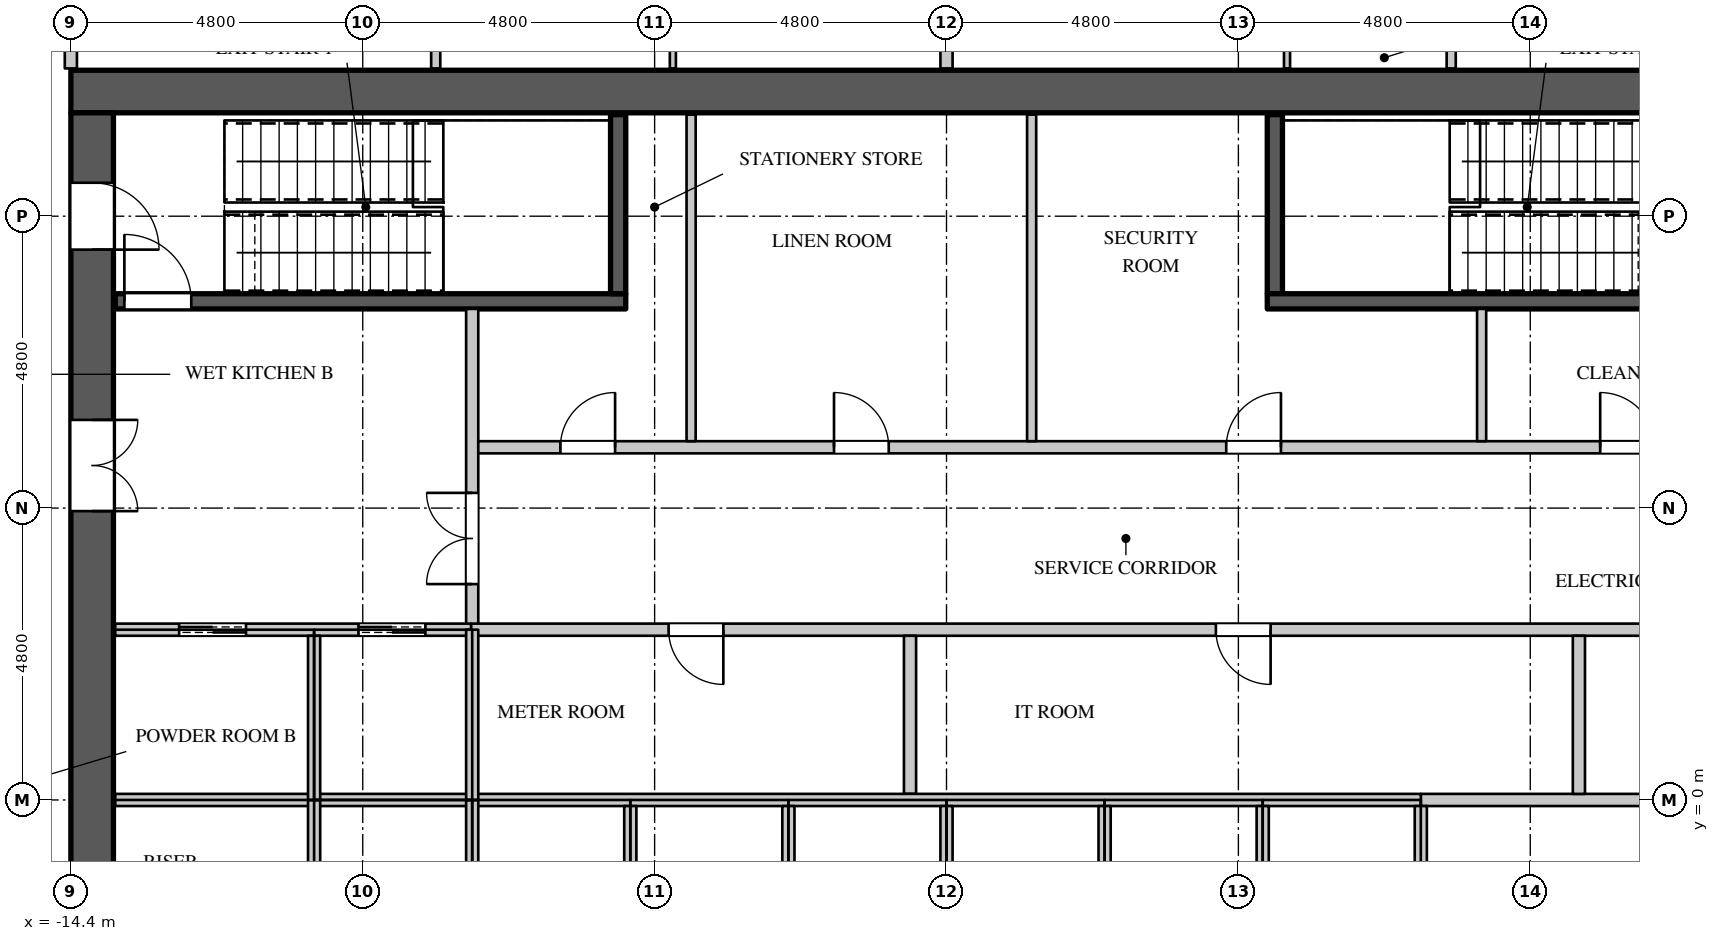
"""IFC4 building model, lengths in metres.
Left out: names, types, materials, properties, quantities, classifications, styles, units other than length and angle.
Written with IfcOpenShell. Run it as: python <this file> out.ifc"""

import sys

from ifc_helpers import new_model, si_unit, direction, frame, frame_2d, origin, place, context, subcontext, project, spatial, rectangle, extrude, element, fill, save


model = new_model("IFC4")
c1 = context("Model", 3, precision=1e-05, world=origin(), true_north=direction((0.0, 1.0)))
c2 = subcontext(c1, "Body", "Model", "MODEL_VIEW")
j1 = project(units=[si_unit("LENGTHUNIT", "METRE"), si_unit("PLANEANGLEUNIT", "RADIAN")], contexts=[c1])
p1 = place(None, origin())
s1 = spatial("IfcSite", under=j1, at=p1, CompositionType="ELEMENT")
p2 = place(p1, origin())
s2 = spatial("IfcBuilding", under=s1, at=p2, CompositionType="ELEMENT")
p3 = place(p2, frame((0.0, 0.0, 204.3)))
s3 = spatial("IfcBuildingStorey", under=s2, at=p3, CompositionType="ELEMENT", Elevation=204.3)
p4 = place(p3, frame((-14.4, 11.65, 0.0), z_axis=(0.0, 0.0, 1.0), x_axis=(1.0, 0.0, 0.0)))
e1 = element("IfcWall", 1, at=p4, inside=s3, PredefinedType="SHEAR", context=c2, shape_type="SweptSolid", body=[
    extrude(rectangle(XDim=28.8, YDim=0.7, at=frame_2d((14.4, 0.0))), origin(), (0.0, 0.0, 1.0), 4.2),
])
p5 = place(p3, frame((-14.05, -11.3, 0.0), z_axis=(0.0, 0.0, 1.0), x_axis=(0.0, 1.0, 0.0)))
e2 = element("IfcWall", 2, at=p5, inside=s3, PredefinedType="SHEAR", context=c2, shape_type="SweptSolid", body=[
    extrude(rectangle(XDim=22.6, YDim=0.7, at=frame_2d((11.3, 0.0))), origin(), (0.0, 0.0, 1.0), 4.2),
])
p6 = place(p5, frame((20.35, 0.0, 0.0)))
e3 = element("IfcOpeningElement", 3, at=p6, cuts=e2, PredefinedType="OPENING", context=c2, shape_type="SweptSolid", body=[
    extrude(rectangle(XDim=1.1, YDim=2.2, at=frame_2d((0.55, 1.1))), frame((0.0, 0.36, 0.0), z_axis=(0.0, -1.0, 0.0), x_axis=(1.0, 0.0, 0.0)), (0.0, 0.0, 1.0), 0.72),
])
p7 = place(p5, frame((1.15, 0.0, 0.0)))
e4 = element("IfcOpeningElement", 4, at=p7, cuts=e2, PredefinedType="OPENING", context=c2, shape_type="SweptSolid", body=[
    extrude(rectangle(XDim=1.1, YDim=2.2, at=frame_2d((0.55, 1.1))), frame((0.0, 0.36, 0.0), z_axis=(0.0, -1.0, 0.0), x_axis=(1.0, 0.0, 0.0)), (0.0, 0.0, 1.0), 0.72),
])
p8 = place(p5, frame((16.05, 0.0, 0.0)))
e5 = element("IfcOpeningElement", 5, at=p8, cuts=e2, PredefinedType="OPENING", context=c2, shape_type="SweptSolid", body=[
    extrude(rectangle(XDim=1.5, YDim=2.4, at=frame_2d((0.75, 1.2))), frame((0.0, 0.36, 0.0), z_axis=(0.0, -1.0, 0.0), x_axis=(1.0, 0.0, 0.0)), (0.0, 0.0, 1.0), 0.72),
])
p9 = place(p5, frame((5.05, 0.0, 0.0)))
e6 = element("IfcOpeningElement", 6, at=p9, cuts=e2, PredefinedType="OPENING", context=c2, shape_type="SweptSolid", body=[
    extrude(rectangle(XDim=1.5, YDim=2.4, at=frame_2d((0.75, 1.2))), frame((0.0, 0.36, 0.0), z_axis=(0.0, -1.0, 0.0), x_axis=(1.0, 0.0, 0.0)), (0.0, 0.0, 1.0), 0.72),
])
p10 = place(p3, frame((-14.4, 12.03, 0.0), z_axis=(0.0, 0.0, 1.0), x_axis=(0.0, 1.0, 0.0)))
e7 = element("IfcWall", 7, at=p10, inside=s3, PredefinedType="PARTITIONING", context=c2, shape_type="SweptSolid", body=[
    extrude(rectangle(XDim=2.27, YDim=0.2, at=frame_2d((1.135, 0.0))), origin(), (0.0, 0.0, 1.0), 3.798),
])
p11 = place(p3, frame((-7.8, 2.8, 0.0), z_axis=(0.0, 0.0, 1.0), x_axis=(0.0, 1.0, 0.0)))
e8 = element("IfcWall", 8, at=p11, inside=s3, PredefinedType="PARTITIONING", context=c2, shape_type="SweptSolid", body=[
    extrude(rectangle(XDim=5.275, YDim=0.2, at=frame_2d((2.637, 0.0))), origin(), (0.0, 0.0, 1.0), 3.798),
])
p12 = place(p11, frame((0.75, 0.0, 0.0)))
e9 = element("IfcOpeningElement", 9, at=p12, cuts=e8, PredefinedType="OPENING", context=c2, shape_type="SweptSolid", body=[
    extrude(rectangle(XDim=1.5, YDim=2.4, at=frame_2d((0.75, 1.2))), frame((0.0, 0.11, 0.0), z_axis=(0.0, -1.0, 0.0), x_axis=(1.0, 0.0, 0.0)), (0.0, 0.0, 1.0), 0.22),
])
p13 = place(p3, frame((-7.7, 5.8, 0.0), z_axis=(0.0, 0.0, 1.0), x_axis=(1.0, 0.0, 0.0)))
e10 = element("IfcWall", 10, at=p13, inside=s3, PredefinedType="PARTITIONING", context=c2, shape_type="SweptSolid", body=[
    extrude(rectangle(XDim=21.37, YDim=0.2, at=frame_2d((10.685, 0.0))), origin(), (0.0, 0.0, 1.0), 3.798),
])
p14 = place(p13, frame((1.35, 0.0, 0.0)))
e11 = element("IfcOpeningElement", 11, at=p14, cuts=e10, PredefinedType="OPENING", context=c2, shape_type="SweptSolid", body=[
    extrude(rectangle(XDim=0.9, YDim=2.2, at=frame_2d((0.45, 1.1))), frame((0.0, 0.11, 0.0), z_axis=(0.0, -1.0, 0.0), x_axis=(1.0, 0.0, 0.0)), (0.0, 0.0, 1.0), 0.22),
])
p15 = place(p13, frame((5.85, 0.0, 0.0)))
e12 = element("IfcOpeningElement", 12, at=p15, cuts=e10, PredefinedType="OPENING", context=c2, shape_type="SweptSolid", body=[
    extrude(rectangle(XDim=0.9, YDim=2.2, at=frame_2d((0.45, 1.1))), frame((0.0, 0.11, 0.0), z_axis=(0.0, -1.0, 0.0), x_axis=(1.0, 0.0, 0.0)), (0.0, 0.0, 1.0), 0.22),
])
p16 = place(p13, frame((12.3, 0.0, 0.0)))
e13 = element("IfcOpeningElement", 13, at=p16, cuts=e10, PredefinedType="OPENING", context=c2, shape_type="SweptSolid", body=[
    extrude(rectangle(XDim=0.9, YDim=2.2, at=frame_2d((0.45, 1.1))), frame((0.0, 0.11, 0.0), z_axis=(0.0, -1.0, 0.0), x_axis=(1.0, 0.0, 0.0)), (0.0, 0.0, 1.0), 0.22),
])
p17 = place(p13, frame((18.45, 0.0, 0.0)))
e14 = element("IfcOpeningElement", 14, at=p17, cuts=e10, PredefinedType="OPENING", context=c2, shape_type="SweptSolid", body=[
    extrude(rectangle(XDim=0.9, YDim=2.2, at=frame_2d((0.45, 1.1))), frame((0.0, 0.11, 0.0), z_axis=(0.0, -1.0, 0.0), x_axis=(1.0, 0.0, 0.0)), (0.0, 0.0, 1.0), 0.22),
])
p18 = place(p3, frame((-8.4, 12.03, 0.0), z_axis=(0.0, 0.0, 1.0), x_axis=(0.0, 1.0, 0.0)))
e15 = element("IfcWall", 15, at=p18, inside=s3, PredefinedType="PARTITIONING", context=c2, shape_type="SweptSolid", body=[
    extrude(rectangle(XDim=4.245, YDim=0.15, at=frame_2d((2.123, 0.0))), origin(), (0.0, 0.0, 1.0), 3.798),
])
for number, where, z_axis, x_axis in (
    (16, (-4.2, 5.9, 0.0), (0.0, 0.0, 1.0), (0.0, 1.0, 0.0)),
    (17, (1.4, 5.9, 0.0), (0.0, 0.0, 1.0), (0.0, 1.0, 0.0)),
):
    element("IfcWall", number, at=place(p3, frame(where, z_axis=z_axis, x_axis=x_axis)), inside=s3, PredefinedType="PARTITIONING", context=c2, shape_type="SweptSolid", body=[
        extrude(rectangle(XDim=5.37, YDim=0.15, at=frame_2d((2.685, 0.0))), origin(), (0.0, 0.0, 1.0), 3.798),
    ])
p19 = place(p3, frame((8.3, 12.03, 0.0), z_axis=(0.0, 0.0, 1.0), x_axis=(0.0, 1.0, 0.0)))
e18 = element("IfcWall", 18, at=p19, inside=s3, PredefinedType="PARTITIONING", context=c2, shape_type="SweptSolid", body=[
    extrude(rectangle(XDim=3.445, YDim=0.15, at=frame_2d((1.723, 0.0))), origin(), (0.0, 0.0, 1.0), 3.798),
])
p20 = place(p19, frame((1.2, 0.0, 0.0)))
e19 = element("IfcOpeningElement", 19, at=p20, cuts=e18, PredefinedType="OPENING", context=c2, shape_type="SweptSolid", body=[
    extrude(rectangle(XDim=0.95, YDim=2.2, at=frame_2d((0.475, 1.1))), frame((0.0, 0.085, 0.0), z_axis=(0.0, -1.0, 0.0), x_axis=(1.0, 0.0, 0.0)), (0.0, 0.0, 1.0), 0.17),
])
p21 = place(p3, frame((8.8, 5.9, 0.0), z_axis=(0.0, 0.0, 1.0), x_axis=(0.0, 1.0, 0.0)))
e20 = element("IfcWall", 20, at=p21, inside=s3, PredefinedType="PARTITIONING", context=c2, shape_type="SweptSolid", body=[
    extrude(rectangle(XDim=2.175, YDim=0.15, at=frame_2d((1.087, 0.0))), origin(), (0.0, 0.0, 1.0), 3.798),
])
p22 = place(p3, frame((0.0, 12.03, 0.0), z_axis=(0.0, 0.0, 1.0), x_axis=(0.0, 1.0, 0.0)))
e21 = element("IfcWall", 21, at=p22, inside=s3, PredefinedType="PARTITIONING", context=c2, shape_type="SweptSolid", body=[
    extrude(rectangle(XDim=11.995, YDim=0.2, at=frame_2d((5.998, 0.0))), origin(), (0.0, 0.0, 1.0), 3.798),
])
p23 = place(p3, frame((-7.82, 2.8, 0.0), z_axis=(0.0, 0.0, 1.0), x_axis=(1.0, 0.0, 0.0)))
e22 = element("IfcWall", 22, at=p23, inside=s3, PredefinedType="PARTITIONING", context=c2, shape_type="SweptSolid", body=[
    extrude(rectangle(XDim=21.49, YDim=0.2, at=frame_2d((10.745, 0.0))), origin(), (0.0, 0.0, 1.0), 3.798),
])
p24 = place(p23, frame((19.5, 0.0, 0.0)))
e23 = element("IfcOpeningElement", 23, at=p24, cuts=e22, PredefinedType="OPENING", context=c2, shape_type="SweptSolid", body=[
    extrude(rectangle(XDim=0.6, YDim=2.0, at=frame_2d((0.3, 1.0))), frame((0.0, 0.11, 0.0), z_axis=(0.0, -1.0, 0.0), x_axis=(1.0, 0.0, 0.0)), (0.0, 0.0, 1.0), 0.22),
])
p25 = place(p23, frame((3.25, 0.0, 0.0)))
e24 = element("IfcOpeningElement", 24, at=p25, cuts=e22, PredefinedType="OPENING", context=c2, shape_type="SweptSolid", body=[
    extrude(rectangle(XDim=0.9, YDim=2.2, at=frame_2d((0.45, 1.1))), frame((0.0, 0.11, 0.0), z_axis=(0.0, -1.0, 0.0), x_axis=(1.0, 0.0, 0.0)), (0.0, 0.0, 1.0), 0.22),
])
p26 = place(p23, frame((12.25, 0.0, 0.0)))
e25 = element("IfcOpeningElement", 25, at=p26, cuts=e22, PredefinedType="OPENING", context=c2, shape_type="SweptSolid", body=[
    extrude(rectangle(XDim=0.9, YDim=2.2, at=frame_2d((0.45, 1.1))), frame((0.0, 0.11, 0.0), z_axis=(0.0, -1.0, 0.0), x_axis=(1.0, 0.0, 0.0)), (0.0, 0.0, 1.0), 0.22),
])
p27 = place(p3, frame((-0.6, 0.1, 0.0), z_axis=(0.0, 0.0, 1.0), x_axis=(0.0, 1.0, 0.0)))
e26 = element("IfcWall", 26, at=p27, inside=s3, PredefinedType="PARTITIONING", context=c2, shape_type="SweptSolid", body=[
    extrude(rectangle(XDim=2.6, YDim=0.2, at=frame_2d((1.3, 0.0))), origin(), (0.0, 0.0, 1.0), 3.798),
])
p28 = place(p3, frame((7.8, 0.0, 0.0), z_axis=(0.0, 0.0, 1.0), x_axis=(1.0, 0.0, 0.0)))
e27 = element("IfcWall", 27, at=p28, inside=s3, PredefinedType="PARTITIONING", context=c2, shape_type="SweptSolid", body=[
    extrude(rectangle(XDim=5.87, YDim=0.2, at=frame_2d((2.935, 0.0))), origin(), (0.0, 0.0, 1.0), 3.798),
])
p29 = place(p3, frame((10.4, 0.1, 0.0), z_axis=(0.0, 0.0, 1.0), x_axis=(0.0, 1.0, 0.0)))
e28 = element("IfcWall", 28, at=p29, inside=s3, PredefinedType="PARTITIONING", context=c2, shape_type="SweptSolid", body=[
    extrude(rectangle(XDim=2.6, YDim=0.2, at=frame_2d((1.3, 0.0))), origin(), (0.0, 0.0, 1.0), 3.798),
])
p30 = place(p3, frame((-13.67, 0.0, 0.0), z_axis=(0.0, 0.0, 1.0), x_axis=(1.0, 0.0, 0.0)))
e29 = element("IfcWall", 29, at=p30, inside=s3, PredefinedType="PARTITIONING", context=c2, shape_type="SweptSolid", body=[
    extrude(rectangle(XDim=21.47, YDim=0.2, at=frame_2d((10.735, 0.0))), origin(), (0.0, 0.0, 1.0), 3.798),
])
p31 = place(p3, frame((-13.67, 2.8, 0.0), z_axis=(0.0, 0.0, 1.0), x_axis=(1.0, 0.0, 0.0)))
e30 = element("IfcWall", 30, at=p31, inside=s3, PredefinedType="PARTITIONING", context=c2, shape_type="SweptSolid", body=[
    extrude(rectangle(XDim=5.85, YDim=0.2, at=frame_2d((2.925, 0.0))), origin(), (0.0, 0.0, 1.0), 3.798),
])
p32 = place(p31, frame((1.05, 0.0, 0.0)))
e31 = element("IfcOpeningElement", 31, at=p32, cuts=e30, PredefinedType="OPENING", context=c2, shape_type="SweptSolid", body=[
    extrude(rectangle(XDim=1.1, YDim=2.2, at=frame_2d((0.55, 1.1))), frame((0.0, 0.11, 0.0), z_axis=(0.0, -1.0, 0.0), x_axis=(1.0, 0.0, 0.0)), (0.0, 0.0, 1.0), 0.22),
])
p33 = place(p31, frame((4.0, 0.0, 0.0)))
e32 = element("IfcOpeningElement", 32, at=p33, cuts=e30, PredefinedType="OPENING", context=c2, shape_type="SweptSolid", body=[
    extrude(rectangle(XDim=1.1, YDim=2.2, at=frame_2d((0.55, 1.1))), frame((0.0, 0.11, 0.0), z_axis=(0.0, -1.0, 0.0), x_axis=(1.0, 0.0, 0.0)), (0.0, 0.0, 1.0), 0.22),
])
for number, where, z_axis, x_axis in (
    (33, (-10.4, -2.7, 0.0), (0.0, 0.0, 1.0), (0.0, 1.0, 0.0)),
    (34, (-10.4, 0.0, 0.0), (0.0, 0.0, 1.0), (0.0, 1.0, 0.0)),
):
    element("IfcWall", number, at=place(p3, frame(where, z_axis=z_axis, x_axis=x_axis)), inside=s3, PredefinedType="PARTITIONING", context=c2, shape_type="SweptSolid", body=[
        extrude(rectangle(XDim=2.7, YDim=0.2, at=frame_2d((1.35, 0.0))), origin(), (0.0, 0.0, 1.0), 3.798),
    ])
for number, where, z_axis, x_axis in (
    (35, (-7.8, -2.8, 0.0), (0.0, 0.0, 1.0), (0.0, 1.0, 0.0)),
    (36, (-7.8, 0.0, 0.0), (0.0, 0.0, 1.0), (0.0, 1.0, 0.0)),
):
    element("IfcWall", number, at=place(p3, frame(where, z_axis=z_axis, x_axis=x_axis)), inside=s3, PredefinedType="PARTITIONING", context=c2, shape_type="SweptSolid", body=[
        extrude(rectangle(XDim=2.8, YDim=0.2, at=frame_2d((1.4, 0.0))), origin(), (0.0, 0.0, 1.0), 3.798),
    ])
for number, where, z_axis, x_axis in (
    (37, (-5.2, -2.7, 0.0), (0.0, 0.0, 1.0), (0.0, 1.0, 0.0)),
    (38, (-2.6, -2.7, 0.0), (0.0, 0.0, 1.0), (0.0, 1.0, 0.0)),
    (39, (0.0, -2.7, 0.0), (0.0, 0.0, 1.0), (0.0, 1.0, 0.0)),
    (40, (2.6, -2.7, 0.0), (0.0, 0.0, 1.0), (0.0, 1.0, 0.0)),
    (41, (5.2, -2.7, 0.0), (0.0, 0.0, 1.0), (0.0, 1.0, 0.0)),
    (42, (7.8, -2.7, 0.0), (0.0, 0.0, 1.0), (0.0, 1.0, 0.0)),
):
    element("IfcWall", number, at=place(p3, frame(where, z_axis=z_axis, x_axis=x_axis)), inside=s3, PredefinedType="PARTITIONING", context=c2, shape_type="SweptSolid", body=[
        extrude(rectangle(XDim=2.6, YDim=0.2, at=frame_2d((1.3, 0.0))), origin(), (0.0, 0.0, 1.0), 3.798),
    ])
p34 = place(p3, frame((-13.67, 8.2, 0.0), z_axis=(0.0, 0.0, 1.0), x_axis=(1.0, 0.0, 0.0)))
e43 = element("IfcWall", 43, at=p34, inside=s3, PredefinedType="SHEAR", context=c2, shape_type="SweptSolid", body=[
    extrude(rectangle(XDim=8.395, YDim=0.25, at=frame_2d((4.198, 0.0))), origin(), (0.0, 0.0, 1.0), 3.798),
])
p35 = place(p34, frame((0.15, 0.0, 0.0)))
e44 = element("IfcOpeningElement", 44, at=p35, cuts=e43, PredefinedType="OPENING", context=c2, shape_type="SweptSolid", body=[
    extrude(rectangle(XDim=1.1, YDim=2.2, at=frame_2d((0.55, 1.1))), frame((0.0, 0.135, 0.0), z_axis=(0.0, -1.0, 0.0), x_axis=(1.0, 0.0, 0.0)), (0.0, 0.0, 1.0), 0.27),
])
for number, where, z_axis, x_axis in (
    (45, (-5.4, 8.325, 0.0), (0.0, 0.0, 1.0), (0.0, 1.0, 0.0)),
    (46, (5.4, 8.325, 0.0), (0.0, 0.0, 1.0), (0.0, 1.0, 0.0)),
):
    element("IfcWall", number, at=place(p3, frame(where, z_axis=z_axis, x_axis=x_axis)), inside=s3, PredefinedType="SHEAR", context=c2, shape_type="SweptSolid", body=[
        extrude(rectangle(XDim=2.945, YDim=0.25, at=frame_2d((1.473, 0.0))), origin(), (0.0, 0.0, 1.0), 3.798),
    ])
p36 = place(p3, frame((5.275, 8.2, 0.0), z_axis=(0.0, 0.0, 1.0), x_axis=(1.0, 0.0, 0.0)))
e47 = element("IfcWall", 47, at=p36, inside=s3, PredefinedType="SHEAR", context=c2, shape_type="SweptSolid", body=[
    extrude(rectangle(XDim=8.395, YDim=0.25, at=frame_2d((4.198, 0.0))), origin(), (0.0, 0.0, 1.0), 3.798),
])
p37 = place(p3, frame((-4.5, 12.03, 0.0), z_axis=(0.0, 0.0, 1.0), x_axis=(0.0, 1.0, 0.0)))
e48 = element("IfcWall", 48, at=p37, inside=s3, PredefinedType="PARTITIONING", context=c2, shape_type="SweptSolid", body=[
    extrude(rectangle(XDim=4.695, YDim=0.1, at=frame_2d((2.348, 0.0))), origin(), (0.0, 0.0, 1.0), 3.798),
])
p38 = place(p3, frame((5.6, 12.03, 0.0), z_axis=(0.0, 0.0, 1.0), x_axis=(0.0, 1.0, 0.0)))
e49 = element("IfcWall", 49, at=p38, inside=s3, PredefinedType="PARTITIONING", context=c2, shape_type="SweptSolid", body=[
    extrude(rectangle(XDim=4.395, YDim=0.1, at=frame_2d((2.198, 0.0))), origin(), (0.0, 0.0, 1.0), 3.798),
])
p39 = place(p14, origin())
e50 = element("IfcDoor", 50, at=p39, inside=s3, OperationType="SINGLE_SWING_RIGHT", PredefinedType="DOOR", context=c2, shape_type="SweptSolid", body=[
    extrude(rectangle(XDim=0.9, YDim=2.2, at=frame_2d((0.45, 1.1))), frame((0.0, 0.025, 0.0), z_axis=(0.0, -1.0, 0.0), x_axis=(1.0, 0.0, 0.0)), (0.0, 0.0, 1.0), 0.05),
])
fill(e11, e50)
p40 = place(p15, origin())
e51 = element("IfcDoor", 51, at=p40, inside=s3, OperationType="SINGLE_SWING_LEFT", PredefinedType="DOOR", context=c2, shape_type="SweptSolid", body=[
    extrude(rectangle(XDim=0.9, YDim=2.2, at=frame_2d((0.45, 1.1))), frame((0.0, 0.025, 0.0), z_axis=(0.0, -1.0, 0.0), x_axis=(1.0, 0.0, 0.0)), (0.0, 0.0, 1.0), 0.05),
])
fill(e12, e51)
p41 = place(p16, origin())
e52 = element("IfcDoor", 52, at=p41, inside=s3, OperationType="SINGLE_SWING_RIGHT", PredefinedType="DOOR", context=c2, shape_type="SweptSolid", body=[
    extrude(rectangle(XDim=0.9, YDim=2.2, at=frame_2d((0.45, 1.1))), frame((0.0, 0.025, 0.0), z_axis=(0.0, -1.0, 0.0), x_axis=(1.0, 0.0, 0.0)), (0.0, 0.0, 1.0), 0.05),
])
fill(e13, e52)
p42 = place(p17, origin())
e53 = element("IfcDoor", 53, at=p42, inside=s3, OperationType="SINGLE_SWING_LEFT", PredefinedType="DOOR", context=c2, shape_type="SweptSolid", body=[
    extrude(rectangle(XDim=0.9, YDim=2.2, at=frame_2d((0.45, 1.1))), frame((0.0, 0.025, 0.0), z_axis=(0.0, -1.0, 0.0), x_axis=(1.0, 0.0, 0.0)), (0.0, 0.0, 1.0), 0.05),
])
fill(e14, e53)
p43 = place(p25, origin())
e54 = element("IfcDoor", 54, at=p43, inside=s3, OperationType="SINGLE_SWING_LEFT", PredefinedType="DOOR", context=c2, shape_type="SweptSolid", body=[
    extrude(rectangle(XDim=0.9, YDim=2.2, at=frame_2d((0.45, 1.1))), frame((0.0, 0.025, 0.0), z_axis=(0.0, -1.0, 0.0), x_axis=(1.0, 0.0, 0.0)), (0.0, 0.0, 1.0), 0.05),
])
fill(e24, e54)
p44 = place(p26, origin())
e55 = element("IfcDoor", 55, at=p44, inside=s3, OperationType="SINGLE_SWING_LEFT", PredefinedType="DOOR", context=c2, shape_type="SweptSolid", body=[
    extrude(rectangle(XDim=0.9, YDim=2.2, at=frame_2d((0.45, 1.1))), frame((0.0, 0.025, 0.0), z_axis=(0.0, -1.0, 0.0), x_axis=(1.0, 0.0, 0.0)), (0.0, 0.0, 1.0), 0.05),
])
fill(e25, e55)
p45 = place(p32, origin())
e56 = element("IfcDoor", 56, at=p45, inside=s3, OperationType="DOUBLE_DOOR_SLIDING", PredefinedType="DOOR", context=c2, shape_type="SweptSolid", body=[
    extrude(rectangle(XDim=1.1, YDim=2.2, at=frame_2d((0.55, 1.1))), frame((0.0, 0.025, 0.0), z_axis=(0.0, -1.0, 0.0), x_axis=(1.0, 0.0, 0.0)), (0.0, 0.0, 1.0), 0.05),
])
fill(e31, e56)
p46 = place(p33, origin())
e57 = element("IfcDoor", 57, at=p46, inside=s3, OperationType="DOUBLE_DOOR_SLIDING", PredefinedType="DOOR", context=c2, shape_type="SweptSolid", body=[
    extrude(rectangle(XDim=1.1, YDim=2.2, at=frame_2d((0.55, 1.1))), frame((0.0, 0.025, 0.0), z_axis=(0.0, -1.0, 0.0), x_axis=(1.0, 0.0, 0.0)), (0.0, 0.0, 1.0), 0.05),
])
fill(e32, e57)
p47 = place(p35, origin())
e58 = element("IfcDoor", 58, at=p47, inside=s3, OperationType="SINGLE_SWING_LEFT", PredefinedType="DOOR", context=c2, shape_type="SweptSolid", body=[
    extrude(rectangle(XDim=1.1, YDim=2.2, at=frame_2d((0.55, 1.1))), frame((0.0, 0.025, 0.0), z_axis=(0.0, -1.0, 0.0), x_axis=(1.0, 0.0, 0.0)), (0.0, 0.0, 1.0), 0.05),
])
fill(e44, e58)
p48 = place(p12, origin())
e59 = element("IfcDoor", 59, at=p48, inside=s3, OperationType="DOUBLE_DOOR_SINGLE_SWING", PredefinedType="DOOR", context=c2, shape_type="SweptSolid", body=[
    extrude(rectangle(XDim=1.5, YDim=2.4, at=frame_2d((0.75, 1.2))), frame((0.0, 0.025, 0.0), z_axis=(0.0, -1.0, 0.0), x_axis=(1.0, 0.0, 0.0)), (0.0, 0.0, 1.0), 0.05),
])
fill(e9, e59)
p49 = place(p6, origin())
e60 = element("IfcDoor", 60, at=p49, inside=s3, OperationType="SINGLE_SWING_RIGHT", PredefinedType="DOOR", context=c2, shape_type="SweptSolid", body=[
    extrude(rectangle(XDim=1.1, YDim=2.2, at=frame_2d((0.55, 1.1))), frame((0.0, -0.295, 0.0), z_axis=(0.0, -1.0, 0.0), x_axis=(1.0, 0.0, 0.0)), (0.0, 0.0, 1.0), 0.05),
])
fill(e3, e60)
p50 = place(p8, origin())
e61 = element("IfcDoor", 61, at=p50, inside=s3, OperationType="DOUBLE_DOOR_SINGLE_SWING", PredefinedType="DOOR", context=c2, shape_type="SweptSolid", body=[
    extrude(rectangle(XDim=1.5, YDim=2.4, at=frame_2d((0.75, 1.2))), frame((0.0, -0.295, 0.0), z_axis=(0.0, -1.0, 0.0), x_axis=(1.0, 0.0, 0.0)), (0.0, 0.0, 1.0), 0.05),
])
fill(e5, e61)
save(model, sys.argv[1])
